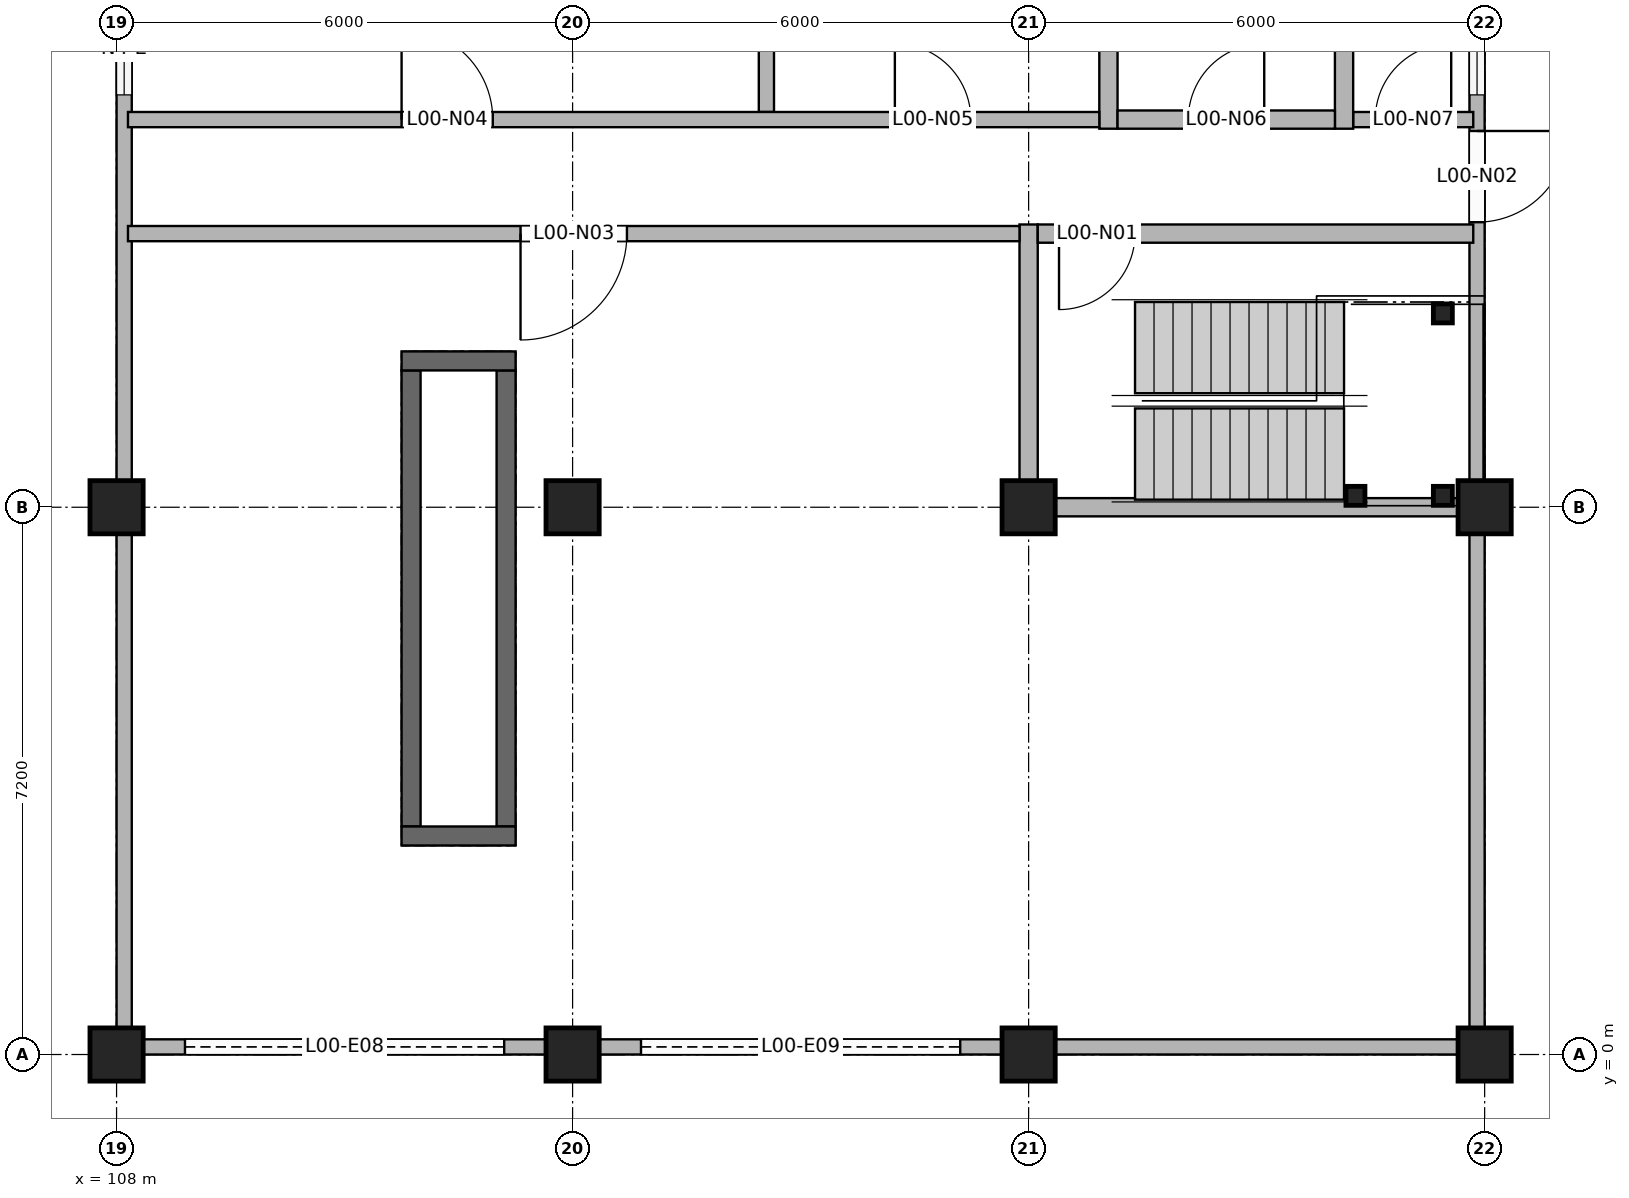
"""IFC4 building model, lengths in metres.
Left out: names, types, materials, properties, quantities, classifications, styles, units other than length and angle.
Written with IfcOpenShell. Run it as: python <this file> out.ifc"""

import sys

from ifc_helpers import new_model, si_unit, direction, frame, frame_2d, origin, origin_2d, place, context, subcontext, project, spatial, rectangle, extrude, element, fill, save


model = new_model("IFC4")
c1 = context("Model", 3, precision=1e-05, world=origin(), true_north=direction((0.0, 1.0)))
c2 = subcontext(c1, "Body", "Model", "MODEL_VIEW")
j1 = project(units=[si_unit("LENGTHUNIT", "METRE"), si_unit("PLANEANGLEUNIT", "RADIAN")], contexts=[c1])
p1 = place(None, origin())
s1 = spatial("IfcSite", under=j1, at=p1, CompositionType="ELEMENT")
p2 = place(p1, origin())
s2 = spatial("IfcBuilding", under=s1, at=p2, CompositionType="ELEMENT")
p3 = place(p2, origin())
s3 = spatial("IfcBuildingStorey", under=s2, at=p3, CompositionType="ELEMENT", Elevation=0.0)
for number, where, z_axis, x_axis in (
    (1, (125.45, 7.35, 0.0), (0.0, 0.0, 1.0), (1.0, 0.0, 0.0)),
    (2, (125.45, 9.75, 0.0), (0.0, 0.0, 1.0), (1.0, 0.0, 0.0)),
    (3, (124.3, 7.35, 0.0), (0.0, 0.0, 1.0), (1.0, 0.0, 0.0)),
):
    element("IfcColumn", number, at=place(p3, frame(where, z_axis=z_axis, x_axis=x_axis)), inside=s3, PredefinedType="COLUMN", context=c2, shape_type="SweptSolid", body=[
        extrude(rectangle(XDim=0.25, YDim=0.25, at=origin_2d()), origin(), (0.0, 0.0, 1.0), 1.9),
    ])
for number, where, z_axis, x_axis in (
    (4, (108.0, 0.0, 0.0), (0.0, 0.0, 1.0), (1.0, 0.0, 0.0)),
    (5, (114.0, 0.0, 0.0), (0.0, 0.0, 1.0), (1.0, 0.0, 0.0)),
    (6, (120.0, 0.0, 0.0), (0.0, 0.0, 1.0), (1.0, 0.0, 0.0)),
    (7, (126.0, 0.0, 0.0), (0.0, 0.0, 1.0), (1.0, 0.0, 0.0)),
):
    element("IfcColumn", number, at=place(p3, frame(where, z_axis=z_axis, x_axis=x_axis)), inside=s3, PredefinedType="COLUMN", context=c2, shape_type="SweptSolid", body=[
        extrude(rectangle(XDim=0.7, YDim=0.7, at=origin_2d()), origin(), (0.0, 0.0, 1.0), 4.2),
    ])
for number, where, z_axis, x_axis in (
    (8, (108.0, 7.2, 0.0), (0.0, 0.0, 1.0), (1.0, 0.0, 0.0)),
    (9, (114.0, 7.2, 0.0), (0.0, 0.0, 1.0), (1.0, 0.0, 0.0)),
):
    element("IfcColumn", number, at=place(p3, frame(where, z_axis=z_axis, x_axis=x_axis)), inside=s3, PredefinedType="COLUMN", context=c2, shape_type="SweptSolid", body=[
        extrude(rectangle(XDim=0.7, YDim=0.7, at=origin_2d()), origin(), (0.0, 0.0, 1.0), 4.0),
    ])
for number, where, z_axis, x_axis in (
    (10, (120.0, 7.2, 0.0), (0.0, 0.0, 1.0), (1.0, 0.0, 0.0)),
    (11, (126.0, 7.2, 0.0), (0.0, 0.0, 1.0), (1.0, 0.0, 0.0)),
):
    element("IfcColumn", number, at=place(p3, frame(where, z_axis=z_axis, x_axis=x_axis)), inside=s3, PredefinedType="COLUMN", context=c2, shape_type="SweptSolid", body=[
        extrude(rectangle(XDim=0.7, YDim=0.7, at=origin_2d()), origin(), (0.0, 0.0, 1.0), 4.2),
    ])
p4 = place(p3, frame((108.35, 0.1, 0.0), z_axis=(0.0, 0.0, 1.0), x_axis=(1.0, 0.0, 0.0)))
e12 = element("IfcWall", 12, at=p4, inside=s3, PredefinedType="SOLIDWALL", context=c2, shape_type="SweptSolid", body=[
    extrude(rectangle(XDim=5.3, YDim=0.2, at=frame_2d((2.65, 0.0))), origin(), (0.0, 0.0, 1.0), 3.8),
])
p5 = place(p4, frame((0.55, 0.0, 0.0)))
e13 = element("IfcOpeningElement", 13, at=p5, cuts=e12, PredefinedType="OPENING", context=c2, shape_type="SweptSolid", body=[
    extrude(rectangle(XDim=4.2, YDim=3.6, at=frame_2d((2.1, 1.8))), frame((0.0, 0.11, 0.0), z_axis=(0.0, -1.0, 0.0), x_axis=(1.0, 0.0, 0.0)), (0.0, 0.0, 1.0), 0.22),
])
p6 = place(p3, frame((114.35, 0.1, 0.0), z_axis=(0.0, 0.0, 1.0), x_axis=(1.0, 0.0, 0.0)))
e14 = element("IfcWall", 14, at=p6, inside=s3, PredefinedType="SOLIDWALL", context=c2, shape_type="SweptSolid", body=[
    extrude(rectangle(XDim=5.3, YDim=0.2, at=frame_2d((2.65, 0.0))), origin(), (0.0, 0.0, 1.0), 3.8),
])
p7 = place(p6, frame((0.55, 0.0, 0.0)))
e15 = element("IfcOpeningElement", 15, at=p7, cuts=e14, PredefinedType="OPENING", context=c2, shape_type="SweptSolid", body=[
    extrude(rectangle(XDim=4.2, YDim=3.6, at=frame_2d((2.1, 1.8))), frame((0.0, 0.11, 0.0), z_axis=(0.0, -1.0, 0.0), x_axis=(1.0, 0.0, 0.0)), (0.0, 0.0, 1.0), 0.22),
])
p8 = place(p3, frame((120.35, 0.1, 0.0), z_axis=(0.0, 0.0, 1.0), x_axis=(1.0, 0.0, 0.0)))
e16 = element("IfcWall", 16, at=p8, inside=s3, PredefinedType="SOLIDWALL", context=c2, shape_type="SweptSolid", body=[
    extrude(rectangle(XDim=5.3, YDim=0.2, at=frame_2d((2.65, 0.0))), origin(), (0.0, 0.0, 1.0), 3.8),
])
p9 = place(p3, frame((125.9, 0.35, 0.0), z_axis=(0.0, 0.0, 1.0), x_axis=(0.0, 1.0, 0.0)))
e17 = element("IfcWall", 17, at=p9, inside=s3, PredefinedType="SOLIDWALL", context=c2, shape_type="SweptSolid", body=[
    extrude(rectangle(XDim=6.5, YDim=0.2, at=frame_2d((3.25, 0.0))), origin(), (0.0, 0.0, 1.0), 4.2),
])
p10 = place(p3, frame((125.9, 7.55, 0.0), z_axis=(0.0, 0.0, 1.0), x_axis=(0.0, 1.0, 0.0)))
e18 = element("IfcWall", 18, at=p10, inside=s3, PredefinedType="SOLIDWALL", context=c2, shape_type="SweptSolid", body=[
    extrude(rectangle(XDim=6.5, YDim=0.2, at=frame_2d((3.25, 0.0))), origin(), (0.0, 0.0, 1.0), 3.1),
])
p11 = place(p10, frame((5.075, 0.0, 1.2)))
e19 = element("IfcOpeningElement", 19, at=p11, cuts=e18, PredefinedType="OPENING", context=c2, shape_type="SweptSolid", body=[
    extrude(rectangle(XDim=1.2, YDim=1.4, at=frame_2d((0.6, 0.7))), frame((0.0, 0.11, 0.0), z_axis=(0.0, -1.0, 0.0), x_axis=(1.0, 0.0, 0.0)), (0.0, 0.0, 1.0), 0.22),
])
p12 = place(p10, frame((3.4, 0.0, 0.0)))
e20 = element("IfcOpeningElement", 20, at=p12, cuts=e18, PredefinedType="OPENING", context=c2, shape_type="SweptSolid", body=[
    extrude(rectangle(XDim=1.2, YDim=2.1, at=frame_2d((0.6, 1.05))), frame((0.0, 0.11, 0.0), z_axis=(0.0, -1.0, 0.0), x_axis=(1.0, 0.0, 0.0)), (0.0, 0.0, 1.0), 0.22),
])
p13 = place(p3, frame((108.1, 0.35, 0.0), z_axis=(0.0, 0.0, 1.0), x_axis=(0.0, 1.0, 0.0)))
e21 = element("IfcWall", 21, at=p13, inside=s3, PredefinedType="SOLIDWALL", context=c2, shape_type="SweptSolid", body=[
    extrude(rectangle(XDim=6.5, YDim=0.2, at=frame_2d((3.25, 0.0))), origin(), (0.0, 0.0, 1.0), 4.2),
])
p14 = place(p3, frame((108.1, 7.55, 0.0), z_axis=(0.0, 0.0, 1.0), x_axis=(0.0, 1.0, 0.0)))
e22 = element("IfcWall", 22, at=p14, inside=s3, PredefinedType="SOLIDWALL", context=c2, shape_type="SweptSolid", body=[
    extrude(rectangle(XDim=6.5, YDim=0.2, at=frame_2d((3.25, 0.0))), origin(), (0.0, 0.0, 1.0), 3.1),
])
p15 = place(p14, frame((5.075, 0.0, 1.2)))
e23 = element("IfcOpeningElement", 23, at=p15, cuts=e22, PredefinedType="OPENING", context=c2, shape_type="SweptSolid", body=[
    extrude(rectangle(XDim=1.2, YDim=1.4, at=frame_2d((0.6, 0.7))), frame((0.0, 0.11, 0.0), z_axis=(0.0, -1.0, 0.0), x_axis=(1.0, 0.0, 0.0)), (0.0, 0.0, 1.0), 0.22),
])
p16 = place(p3, frame((116.55, 12.4, 0.0), z_axis=(0.0, 0.0, 1.0), x_axis=(0.0, 1.0, 0.0)))
e24 = element("IfcWall", 24, at=p16, inside=s3, PredefinedType="PARTITIONING", context=c2, shape_type="SweptSolid", body=[
    extrude(rectangle(XDim=9.05, YDim=0.2, at=frame_2d((4.525, 0.0))), origin(), (0.0, 0.0, 1.0), 3.2),
])
p17 = place(p3, frame((120.0, 7.55, 0.0), z_axis=(0.0, 0.0, 1.0), x_axis=(0.0, 1.0, 0.0)))
e25 = element("IfcWall", 25, at=p17, inside=s3, PredefinedType="PARTITIONING", context=c2, shape_type="SweptSolid", body=[
    extrude(rectangle(XDim=3.37, YDim=0.24, at=frame_2d((1.685, 0.0))), origin(), (0.0, 0.0, 1.0), 3.1),
])
for number, where, z_axis, x_axis in (
    (26, (121.05, 12.18, 0.0), (0.0, 0.0, 1.0), (0.0, 1.0, 0.0)),
    (27, (124.15, 12.18, 0.0), (0.0, 0.0, 1.0), (0.0, 1.0, 0.0)),
):
    element("IfcWall", number, at=place(p3, frame(where, z_axis=z_axis, x_axis=x_axis)), inside=s3, PredefinedType="PARTITIONING", context=c2, shape_type="SweptSolid", body=[
        extrude(rectangle(XDim=9.27, YDim=0.24, at=frame_2d((4.635, 0.0))), origin(), (0.0, 0.0, 1.0), 3.2),
    ])
p18 = place(p3, frame((120.35, 7.2, 0.0), z_axis=(0.0, 0.0, 1.0), x_axis=(1.0, 0.0, 0.0)))
e28 = element("IfcWall", 28, at=p18, inside=s3, PredefinedType="PARTITIONING", context=c2, shape_type="SweptSolid", body=[
    extrude(rectangle(XDim=5.3, YDim=0.24, at=frame_2d((2.65, 0.0))), origin(), (0.0, 0.0, 1.0), 3.2),
])
p19 = place(p3, frame((108.15, 10.8, 0.0), z_axis=(0.0, 0.0, 1.0), x_axis=(1.0, 0.0, 0.0)))
e29 = element("IfcWall", 29, at=p19, inside=s3, PredefinedType="PARTITIONING", context=c2, shape_type="SweptSolid", body=[
    extrude(rectangle(XDim=11.73, YDim=0.2, at=frame_2d((5.865, 0.0))), origin(), (0.0, 0.0, 1.0), 3.1),
])
p20 = place(p19, frame((5.165, 0.0, 0.0)))
e30 = element("IfcOpeningElement", 30, at=p20, cuts=e29, PredefinedType="OPENING", context=c2, shape_type="SweptSolid", body=[
    extrude(rectangle(XDim=1.4, YDim=2.1, at=frame_2d((0.7, 1.05))), frame((0.0, 0.11, 0.0), z_axis=(0.0, -1.0, 0.0), x_axis=(1.0, 0.0, 0.0)), (0.0, 0.0, 1.0), 0.22),
])
p21 = place(p3, frame((120.12, 10.8, 0.0), z_axis=(0.0, 0.0, 1.0), x_axis=(1.0, 0.0, 0.0)))
e31 = element("IfcWall", 31, at=p21, inside=s3, PredefinedType="PARTITIONING", context=c2, shape_type="SweptSolid", body=[
    extrude(rectangle(XDim=5.73, YDim=0.24, at=frame_2d((2.865, 0.0))), origin(), (0.0, 0.0, 1.0), 3.1),
])
p22 = place(p21, frame((0.28, 0.0, 0.0)))
e32 = element("IfcOpeningElement", 32, at=p22, cuts=e31, PredefinedType="OPENING", context=c2, shape_type="SweptSolid", body=[
    extrude(rectangle(XDim=1.0, YDim=2.1, at=frame_2d((0.5, 1.05))), frame((0.0, 0.13, 0.0), z_axis=(0.0, -1.0, 0.0), x_axis=(1.0, 0.0, 0.0)), (0.0, 0.0, 1.0), 0.26),
])
p23 = place(p3, frame((108.15, 12.3, 0.0), z_axis=(0.0, 0.0, 1.0), x_axis=(1.0, 0.0, 0.0)))
e33 = element("IfcWall", 33, at=p23, inside=s3, PredefinedType="PARTITIONING", context=c2, shape_type="SweptSolid", body=[
    extrude(rectangle(XDim=12.78, YDim=0.2, at=frame_2d((6.39, 0.0))), origin(), (0.0, 0.0, 1.0), 3.1),
])
p24 = place(p23, frame((3.6, 0.0, 0.0)))
e34 = element("IfcOpeningElement", 34, at=p24, cuts=e33, PredefinedType="OPENING", context=c2, shape_type="SweptSolid", body=[
    extrude(rectangle(XDim=1.2, YDim=2.1, at=frame_2d((0.6, 1.05))), frame((0.0, 0.11, 0.0), z_axis=(0.0, -1.0, 0.0), x_axis=(1.0, 0.0, 0.0)), (0.0, 0.0, 1.0), 0.22),
])
p25 = place(p23, frame((10.09, 0.0, 0.0)))
e35 = element("IfcOpeningElement", 35, at=p25, cuts=e33, PredefinedType="OPENING", context=c2, shape_type="SweptSolid", body=[
    extrude(rectangle(XDim=1.0, YDim=2.1, at=frame_2d((0.5, 1.05))), frame((0.0, 0.11, 0.0), z_axis=(0.0, -1.0, 0.0), x_axis=(1.0, 0.0, 0.0)), (0.0, 0.0, 1.0), 0.22),
])
p26 = place(p3, frame((121.17, 12.3, 0.0), z_axis=(0.0, 0.0, 1.0), x_axis=(1.0, 0.0, 0.0)))
e36 = element("IfcWall", 36, at=p26, inside=s3, PredefinedType="PARTITIONING", context=c2, shape_type="SweptSolid", body=[
    extrude(rectangle(XDim=2.86, YDim=0.24, at=frame_2d((1.43, 0.0))), origin(), (0.0, 0.0, 1.0), 4.0),
])
p27 = place(p26, frame((0.93, 0.0, 0.0)))
e37 = element("IfcOpeningElement", 37, at=p27, cuts=e36, PredefinedType="OPENING", context=c2, shape_type="SweptSolid", body=[
    extrude(rectangle(XDim=1.0, YDim=2.1, at=frame_2d((0.5, 1.05))), frame((0.0, 0.13, 0.0), z_axis=(0.0, -1.0, 0.0), x_axis=(1.0, 0.0, 0.0)), (0.0, 0.0, 1.0), 0.26),
])
p28 = place(p3, frame((124.27, 12.3, 0.0), z_axis=(0.0, 0.0, 1.0), x_axis=(1.0, 0.0, 0.0)))
e38 = element("IfcWall", 38, at=p28, inside=s3, PredefinedType="PARTITIONING", context=c2, shape_type="SweptSolid", body=[
    extrude(rectangle(XDim=1.58, YDim=0.2, at=frame_2d((0.79, 0.0))), origin(), (0.0, 0.0, 1.0), 3.1),
])
p29 = place(p28, frame((0.29, 0.0, 0.0)))
e39 = element("IfcOpeningElement", 39, at=p29, cuts=e38, PredefinedType="OPENING", context=c2, shape_type="SweptSolid", body=[
    extrude(rectangle(XDim=1.0, YDim=2.1, at=frame_2d((0.5, 1.05))), frame((0.0, 0.11, 0.0), z_axis=(0.0, -1.0, 0.0), x_axis=(1.0, 0.0, 0.0)), (0.0, 0.0, 1.0), 0.22),
])
for number, where, z_axis, x_axis in (
    (40, (111.875, 3.0, -1.0), (0.0, 0.0, 1.0), (0.0, 1.0, 0.0)),
    (41, (113.125, 3.0, -1.0), (0.0, 0.0, 1.0), (0.0, 1.0, 0.0)),
):
    element("IfcWall", number, at=place(p3, frame(where, z_axis=z_axis, x_axis=x_axis)), inside=s3, PredefinedType="SOLIDWALL", context=c2, shape_type="SweptSolid", body=[
        extrude(rectangle(XDim=6.0, YDim=0.25, at=frame_2d((3.0, 0.0))), origin(), (0.0, 0.0, 1.0), 1.0),
    ])
for number, where, z_axis, x_axis in (
    (42, (111.75, 2.875, -1.0), (0.0, 0.0, 1.0), (1.0, 0.0, 0.0)),
    (43, (111.75, 9.125, -1.0), (0.0, 0.0, 1.0), (1.0, 0.0, 0.0)),
):
    element("IfcWall", number, at=place(p3, frame(where, z_axis=z_axis, x_axis=x_axis)), inside=s3, PredefinedType="SOLIDWALL", context=c2, shape_type="SweptSolid", body=[
        extrude(rectangle(XDim=1.5, YDim=0.25, at=frame_2d((0.75, 0.0))), origin(), (0.0, 0.0, 1.0), 1.0),
    ])
p30 = place(p5, frame((4.2, 0.0, 0.0), z_axis=(0.0, 0.0, 1.0), x_axis=(-1.0, 0.0, 0.0)))
e44 = element("IfcDoor", 44, at=p30, inside=s3, OperationType="ROLLINGUP", PredefinedType="DOOR", context=c2, shape_type="SweptSolid", body=[
    extrude(rectangle(XDim=4.2, YDim=3.6, at=frame_2d((2.1, 1.8))), frame((0.0, 0.025, 0.0), z_axis=(0.0, -1.0, 0.0), x_axis=(1.0, 0.0, 0.0)), (0.0, 0.0, 1.0), 0.05),
])
fill(e13, e44)
p31 = place(p7, frame((4.2, 0.0, 0.0), z_axis=(0.0, 0.0, 1.0), x_axis=(-1.0, 0.0, 0.0)))
e45 = element("IfcDoor", 45, at=p31, inside=s3, OperationType="ROLLINGUP", PredefinedType="DOOR", context=c2, shape_type="SweptSolid", body=[
    extrude(rectangle(XDim=4.2, YDim=3.6, at=frame_2d((2.1, 1.8))), frame((0.0, 0.025, 0.0), z_axis=(0.0, -1.0, 0.0), x_axis=(1.0, 0.0, 0.0)), (0.0, 0.0, 1.0), 0.05),
])
fill(e15, e45)
p32 = place(p11, origin())
e46 = element("IfcWindow", 46, at=p32, inside=s3, PartitioningType="SINGLE_PANEL", PredefinedType="WINDOW", context=c2, shape_type="SweptSolid", body=[
    extrude(rectangle(XDim=1.2, YDim=1.4, at=frame_2d((0.6, 0.7))), frame((0.0, 0.03, 0.0), z_axis=(0.0, -1.0, 0.0), x_axis=(1.0, 0.0, 0.0)), (0.0, 0.0, 1.0), 0.06),
])
fill(e19, e46)
p33 = place(p15, origin())
e47 = element("IfcWindow", 47, at=p33, inside=s3, PartitioningType="SINGLE_PANEL", PredefinedType="WINDOW", context=c2, shape_type="SweptSolid", body=[
    extrude(rectangle(XDim=1.2, YDim=1.4, at=frame_2d((0.6, 0.7))), frame((0.0, 0.03, 0.0), z_axis=(0.0, -1.0, 0.0), x_axis=(1.0, 0.0, 0.0)), (0.0, 0.0, 1.0), 0.06),
])
fill(e23, e47)
p34 = place(p22, frame((1.0, 0.0, 0.0), z_axis=(0.0, 0.0, 1.0), x_axis=(-1.0, 0.0, 0.0)))
e48 = element("IfcDoor", 48, at=p34, inside=s3, OperationType="SINGLE_SWING_RIGHT", PredefinedType="DOOR", context=c2, shape_type="SweptSolid", body=[
    extrude(rectangle(XDim=1.0, YDim=2.1, at=frame_2d((0.5, 1.05))), frame((0.0, 0.025, 0.0), z_axis=(0.0, -1.0, 0.0), x_axis=(1.0, 0.0, 0.0)), (0.0, 0.0, 1.0), 0.05),
])
fill(e32, e48)
p35 = place(p12, frame((1.2, 0.0, 0.0), z_axis=(0.0, 0.0, 1.0), x_axis=(-1.0, 0.0, 0.0)))
e49 = element("IfcDoor", 49, at=p35, inside=s3, OperationType="SINGLE_SWING_LEFT", PredefinedType="DOOR", context=c2, shape_type="SweptSolid", body=[
    extrude(rectangle(XDim=1.2, YDim=2.1, at=frame_2d((0.6, 1.05))), frame((0.0, 0.025, 0.0), z_axis=(0.0, -1.0, 0.0), x_axis=(1.0, 0.0, 0.0)), (0.0, 0.0, 1.0), 0.05),
])
fill(e20, e49)
p36 = place(p20, frame((1.4, 0.0, 0.0), z_axis=(0.0, 0.0, 1.0), x_axis=(-1.0, 0.0, 0.0)))
e50 = element("IfcDoor", 50, at=p36, inside=s3, OperationType="SINGLE_SWING_RIGHT", PredefinedType="DOOR", context=c2, shape_type="SweptSolid", body=[
    extrude(rectangle(XDim=1.4, YDim=2.1, at=frame_2d((0.7, 1.05))), frame((0.0, 0.025, 0.0), z_axis=(0.0, -1.0, 0.0), x_axis=(1.0, 0.0, 0.0)), (0.0, 0.0, 1.0), 0.05),
])
fill(e30, e50)
p37 = place(p24, origin())
e51 = element("IfcDoor", 51, at=p37, inside=s3, OperationType="SINGLE_SWING_LEFT", PredefinedType="DOOR", context=c2, shape_type="SweptSolid", body=[
    extrude(rectangle(XDim=1.2, YDim=2.1, at=frame_2d((0.6, 1.05))), frame((0.0, 0.025, 0.0), z_axis=(0.0, -1.0, 0.0), x_axis=(1.0, 0.0, 0.0)), (0.0, 0.0, 1.0), 0.05),
])
fill(e34, e51)
p38 = place(p25, origin())
e52 = element("IfcDoor", 52, at=p38, inside=s3, OperationType="SINGLE_SWING_LEFT", PredefinedType="DOOR", context=c2, shape_type="SweptSolid", body=[
    extrude(rectangle(XDim=1.0, YDim=2.1, at=frame_2d((0.5, 1.05))), frame((0.0, 0.025, 0.0), z_axis=(0.0, -1.0, 0.0), x_axis=(1.0, 0.0, 0.0)), (0.0, 0.0, 1.0), 0.05),
])
fill(e35, e52)
p39 = place(p27, origin())
e53 = element("IfcDoor", 53, at=p39, inside=s3, OperationType="SINGLE_SWING_RIGHT", PredefinedType="DOOR", context=c2, shape_type="SweptSolid", body=[
    extrude(rectangle(XDim=1.0, YDim=2.1, at=frame_2d((0.5, 1.05))), frame((0.0, 0.025, 0.0), z_axis=(0.0, -1.0, 0.0), x_axis=(1.0, 0.0, 0.0)), (0.0, 0.0, 1.0), 0.05),
])
fill(e37, e53)
p40 = place(p29, origin())
e54 = element("IfcDoor", 54, at=p40, inside=s3, OperationType="SINGLE_SWING_RIGHT", PredefinedType="DOOR", context=c2, shape_type="SweptSolid", body=[
    extrude(rectangle(XDim=1.0, YDim=2.1, at=frame_2d((0.5, 1.05))), frame((0.0, 0.025, 0.0), z_axis=(0.0, -1.0, 0.0), x_axis=(1.0, 0.0, 0.0)), (0.0, 0.0, 1.0), 0.05),
])
fill(e39, e54)
save(model, sys.argv[1])
